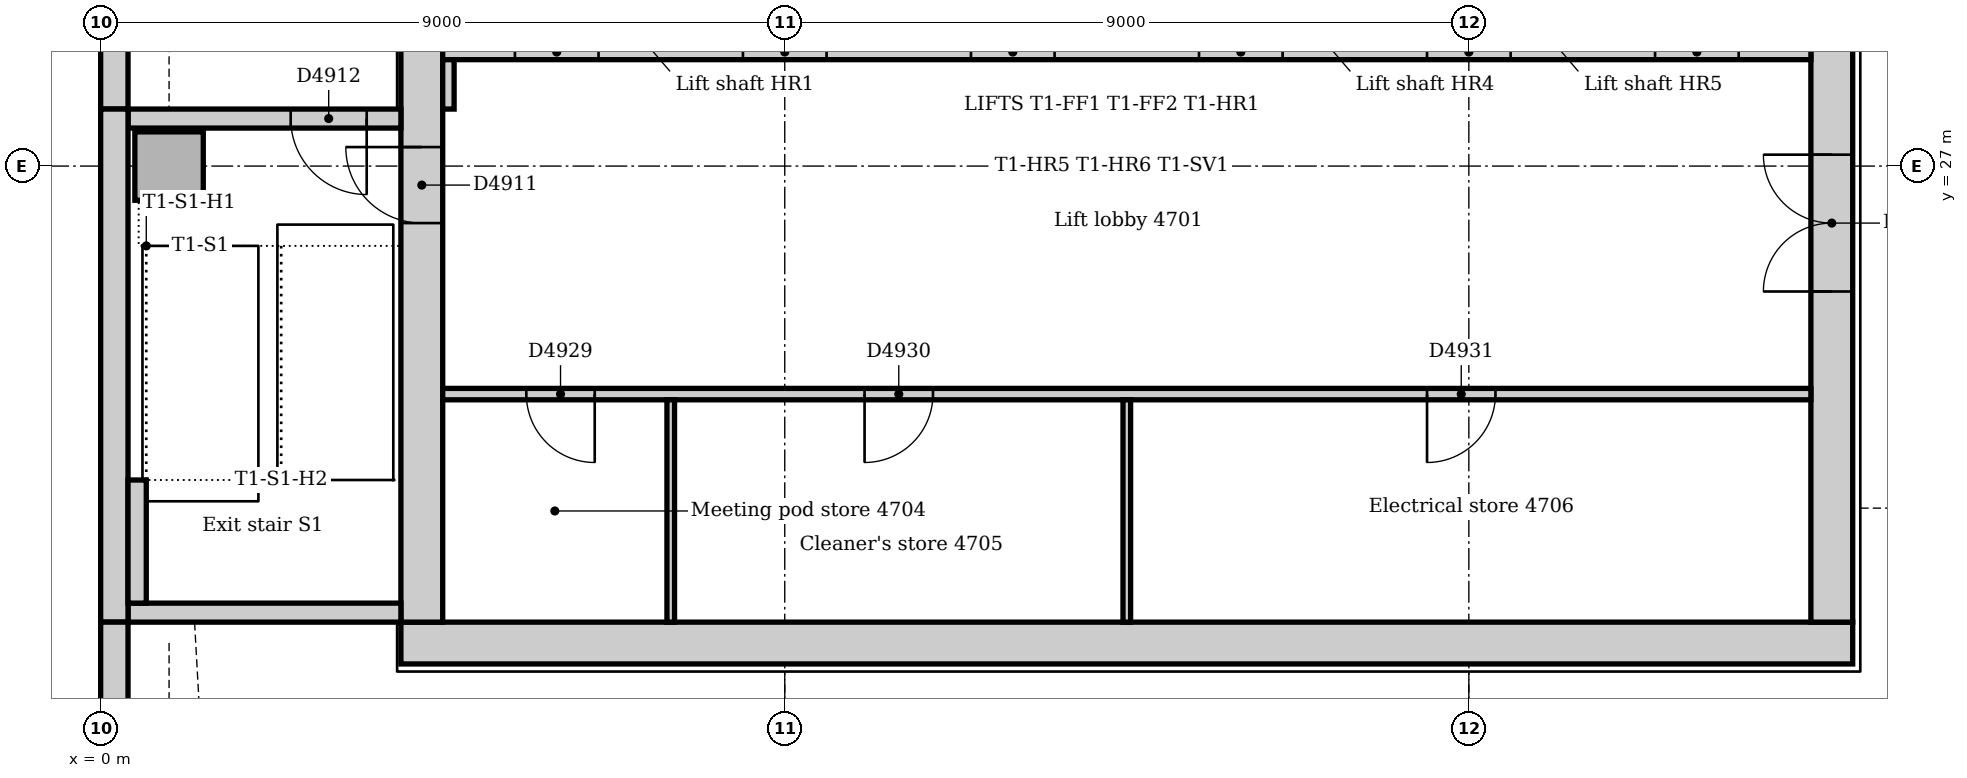
"""IFC4 building model, lengths in metres.
Left out: names, types, materials, properties, quantities, classifications, styles, units other than length and angle.
Written with IfcOpenShell. Run it as: python <this file> out.ifc"""

import sys

from ifc_helpers import new_model, si_unit, direction, frame, frame_2d, origin, origin_2d, place, context, subcontext, project, spatial, rectangle, extrude, element, fill, save


model = new_model("IFC4")
c1 = context("Model", 3, precision=1e-05, world=origin(), true_north=direction((0.0, 1.0)))
c2 = subcontext(c1, "Body", "Model", "MODEL_VIEW")
j1 = project(units=[si_unit("LENGTHUNIT", "METRE"), si_unit("PLANEANGLEUNIT", "RADIAN")], contexts=[c1])
p1 = place(None, origin())
s1 = spatial("IfcSite", under=j1, at=p1, CompositionType="ELEMENT")
p2 = place(p1, origin())
s2 = spatial("IfcBuilding", under=s1, at=p2, CompositionType="ELEMENT")
p3 = place(p2, frame((0.0, 0.0, 198.0)))
s3 = spatial("IfcBuildingStorey", under=s2, at=p3, CompositionType="ELEMENT", Elevation=198.0)
p4 = place(p3, frame((3.95, 20.725, 0.0), z_axis=(0.0, 0.0, 1.0), x_axis=(1.0, 0.0, 0.0)))
e1 = element("IfcWall", 1, at=p4, inside=s3, PredefinedType="SOLIDWALL", context=c2, shape_type="SweptSolid", body=[
    extrude(rectangle(XDim=19.1, YDim=0.55, at=frame_2d((9.55, 0.0))), origin(), (0.0, 0.0, 1.0), 4.0),
])
p5 = place(p3, frame((22.775, 21.0, 0.0), z_axis=(0.0, 0.0, 1.0), x_axis=(0.0, 1.0, 0.0)))
e2 = element("IfcWall", 2, at=p5, inside=s3, PredefinedType="SOLIDWALL", context=c2, shape_type="SweptSolid", body=[
    extrude(rectangle(XDim=10.5, YDim=0.55, at=frame_2d((5.25, 0.0))), origin(), (0.0, 0.0, 1.0), 4.0),
])
p6 = place(p5, frame((4.35, 0.0, 0.0)))
e3 = element("IfcOpeningElement", 3, at=p6, cuts=e2, PredefinedType="OPENING", context=c2, shape_type="SweptSolid", body=[
    extrude(rectangle(XDim=1.8, YDim=2.1, at=frame_2d((0.9, 1.05))), frame((0.0, 0.285, 0.0), z_axis=(0.0, -1.0, 0.0), x_axis=(1.0, 0.0, 0.0)), (0.0, 0.0, 1.0), 0.57),
])
p7 = place(p3, frame((4.225, 31.5, 0.0), z_axis=(0.0, 0.0, 1.0), x_axis=(0.0, -1.0, 0.0)))
e4 = element("IfcWall", 4, at=p7, inside=s3, PredefinedType="SOLIDWALL", context=c2, shape_type="SweptSolid", body=[
    extrude(rectangle(XDim=10.5, YDim=0.55, at=frame_2d((5.25, 0.0))), origin(), (0.0, 0.0, 1.0), 4.0),
])
p8 = place(p7, frame((4.25, 0.0, 0.0)))
e5 = element("IfcOpeningElement", 5, at=p8, cuts=e4, PredefinedType="OPENING", context=c2, shape_type="SweptSolid", body=[
    extrude(rectangle(XDim=1.0, YDim=2.1, at=frame_2d((0.5, 1.05))), frame((0.0, 0.285, 0.0), z_axis=(0.0, -1.0, 0.0), x_axis=(1.0, 0.0, 0.0)), (0.0, 0.0, 1.0), 0.57),
])
p9 = place(p3, frame((0.36, 21.125, 0.0), z_axis=(0.0, 0.0, 1.0), x_axis=(1.0, 0.0, 0.0)))
e6 = element("IfcWall", 6, at=p9, inside=s3, PredefinedType="SOLIDWALL", context=c2, shape_type="SweptSolid", body=[
    extrude(rectangle(XDim=3.59, YDim=0.25, at=frame_2d((1.795, 0.0))), origin(), (0.0, 0.0, 1.0), 4.0),
])
p10 = place(p3, frame((3.95, 27.625, 0.0), z_axis=(0.0, 0.0, 1.0), x_axis=(-1.0, 0.0, 0.0)))
e7 = element("IfcWall", 7, at=p10, inside=s3, PredefinedType="SOLIDWALL", context=c2, shape_type="SweptSolid", body=[
    extrude(rectangle(XDim=3.59, YDim=0.25, at=frame_2d((1.795, 0.0))), origin(), (0.0, 0.0, 1.0), 4.0),
])
p11 = place(p10, frame((0.45, 0.0, 0.0)))
e8 = element("IfcOpeningElement", 8, at=p11, cuts=e7, PredefinedType="OPENING", context=c2, shape_type="SweptSolid", body=[
    extrude(rectangle(XDim=1.0, YDim=2.1, at=frame_2d((0.5, 1.05))), frame((0.0, 0.135, 0.0), z_axis=(0.0, -1.0, 0.0), x_axis=(1.0, 0.0, 0.0)), (0.0, 0.0, 1.0), 0.27),
])
p12 = place(p3, frame((0.9, 27.0, 0.0), z_axis=(0.0, 0.0, 1.0), x_axis=(1.0, 0.0, 0.0)))
e9 = element("IfcColumn", 9, at=p12, inside=s3, PredefinedType="COLUMN", context=c2, shape_type="SweptSolid", body=[
    extrude(rectangle(XDim=0.9, YDim=0.9, at=origin_2d()), origin(), (0.0, 0.0, 1.0), 4.0),
])
p13 = place(p3, frame((0.18, 35.25, 0.0), z_axis=(0.0, 0.0, 1.0), x_axis=(0.0, -1.0, 0.0)))
e10 = element("IfcWall", 10, at=p13, inside=s3, PredefinedType="STANDARD", context=c2, shape_type="SweptSolid", body=[
    extrude(rectangle(XDim=7.5, YDim=0.36, at=frame_2d((3.75, 0.0))), origin(), (0.0, 0.0, 1.0), 3.85),
])
p14 = place(p3, frame((0.18, 27.75, 0.0), z_axis=(0.0, 0.0, 1.0), x_axis=(0.0, -1.0, 0.0)))
e11 = element("IfcWall", 11, at=p14, inside=s3, PredefinedType="STANDARD", context=c2, shape_type="SweptSolid", body=[
    extrude(rectangle(XDim=6.75, YDim=0.36, at=frame_2d((3.375, 0.0))), origin(), (0.0, 0.0, 1.0), 3.85),
])
p15 = place(p3, frame((0.18, 21.0, 0.0), z_axis=(0.0, 0.0, 1.0), x_axis=(0.0, -1.0, 0.0)))
e12 = element("IfcWall", 12, at=p15, inside=s3, PredefinedType="STANDARD", context=c2, shape_type="SweptSolid", body=[
    extrude(rectangle(XDim=3.257, YDim=0.36, at=frame_2d((1.629, 0.0))), origin(), (0.0, 0.0, 1.0), 3.85),
])
p16 = place(p3, frame((0.48, 21.25, 0.0), z_axis=(0.0, 0.0, 1.0), x_axis=(0.0, 1.0, 0.0)))
e13 = element("IfcWall", 13, at=p16, inside=s3, PredefinedType="STANDARD", context=c2, shape_type="SweptSolid", body=[
    extrude(rectangle(XDim=1.62, YDim=0.24, at=frame_2d((0.81, 0.0))), origin(), (0.0, 0.0, 1.0), 4.0),
])
p17 = place(p3, frame((4.5, 28.5, 0.0), z_axis=(0.0, 0.0, 1.0), x_axis=(1.0, 0.0, 0.0)))
e14 = element("IfcWall", 14, at=p17, inside=s3, PredefinedType="PARTITIONING", context=c2, shape_type="SweptSolid", body=[
    extrude(rectangle(XDim=18.0, YDim=0.2, at=frame_2d((9.0, 0.0))), origin(), (0.0, 0.0, 1.0), 3.85),
])
p18 = place(p17, frame((0.95, 0.0, 0.0)))
e15 = element("IfcOpeningElement", 15, at=p18, cuts=e14, PredefinedType="OPENING", context=c2, shape_type="SweptSolid", body=[
    extrude(rectangle(XDim=1.1, YDim=2.1, at=frame_2d((0.55, 1.05))), frame((0.0, 0.11, 0.0), z_axis=(0.0, -1.0, 0.0), x_axis=(1.0, 0.0, 0.0)), (0.0, 0.0, 1.0), 0.22),
])
p19 = place(p17, frame((3.95, 0.0, 0.0)))
e16 = element("IfcOpeningElement", 16, at=p19, cuts=e14, PredefinedType="OPENING", context=c2, shape_type="SweptSolid", body=[
    extrude(rectangle(XDim=1.1, YDim=2.1, at=frame_2d((0.55, 1.05))), frame((0.0, 0.11, 0.0), z_axis=(0.0, -1.0, 0.0), x_axis=(1.0, 0.0, 0.0)), (0.0, 0.0, 1.0), 0.22),
])
p20 = place(p17, frame((6.95, 0.0, 0.0)))
e17 = element("IfcOpeningElement", 17, at=p20, cuts=e14, PredefinedType="OPENING", context=c2, shape_type="SweptSolid", body=[
    extrude(rectangle(XDim=1.1, YDim=2.1, at=frame_2d((0.55, 1.05))), frame((0.0, 0.11, 0.0), z_axis=(0.0, -1.0, 0.0), x_axis=(1.0, 0.0, 0.0)), (0.0, 0.0, 1.0), 0.22),
])
p21 = place(p17, frame((9.95, 0.0, 0.0)))
e18 = element("IfcOpeningElement", 18, at=p21, cuts=e14, PredefinedType="OPENING", context=c2, shape_type="SweptSolid", body=[
    extrude(rectangle(XDim=1.1, YDim=2.1, at=frame_2d((0.55, 1.05))), frame((0.0, 0.11, 0.0), z_axis=(0.0, -1.0, 0.0), x_axis=(1.0, 0.0, 0.0)), (0.0, 0.0, 1.0), 0.22),
])
p22 = place(p17, frame((12.95, 0.0, 0.0)))
e19 = element("IfcOpeningElement", 19, at=p22, cuts=e14, PredefinedType="OPENING", context=c2, shape_type="SweptSolid", body=[
    extrude(rectangle(XDim=1.1, YDim=2.1, at=frame_2d((0.55, 1.05))), frame((0.0, 0.11, 0.0), z_axis=(0.0, -1.0, 0.0), x_axis=(1.0, 0.0, 0.0)), (0.0, 0.0, 1.0), 0.22),
])
p23 = place(p17, frame((15.95, 0.0, 0.0)))
e20 = element("IfcOpeningElement", 20, at=p23, cuts=e14, PredefinedType="OPENING", context=c2, shape_type="SweptSolid", body=[
    extrude(rectangle(XDim=1.1, YDim=2.1, at=frame_2d((0.55, 1.05))), frame((0.0, 0.11, 0.0), z_axis=(0.0, -1.0, 0.0), x_axis=(1.0, 0.0, 0.0)), (0.0, 0.0, 1.0), 0.22),
])
p24 = place(p3, frame((4.5, 24.0, 0.0), z_axis=(0.0, 0.0, 1.0), x_axis=(1.0, 0.0, 0.0)))
e21 = element("IfcWall", 21, at=p24, inside=s3, PredefinedType="PARTITIONING", context=c2, shape_type="SweptSolid", body=[
    extrude(rectangle(XDim=18.0, YDim=0.15, at=frame_2d((9.0, 0.0))), origin(), (0.0, 0.0, 1.0), 3.85),
])
p25 = place(p24, frame((1.1, 0.0, 0.0)))
e22 = element("IfcOpeningElement", 22, at=p25, cuts=e21, PredefinedType="OPENING", context=c2, shape_type="SweptSolid", body=[
    extrude(rectangle(XDim=0.9, YDim=2.1, at=frame_2d((0.45, 1.05))), frame((0.0, 0.085, 0.0), z_axis=(0.0, -1.0, 0.0), x_axis=(1.0, 0.0, 0.0)), (0.0, 0.0, 1.0), 0.17),
])
p26 = place(p24, frame((5.55, 0.0, 0.0)))
e23 = element("IfcOpeningElement", 23, at=p26, cuts=e21, PredefinedType="OPENING", context=c2, shape_type="SweptSolid", body=[
    extrude(rectangle(XDim=0.9, YDim=2.1, at=frame_2d((0.45, 1.05))), frame((0.0, 0.085, 0.0), z_axis=(0.0, -1.0, 0.0), x_axis=(1.0, 0.0, 0.0)), (0.0, 0.0, 1.0), 0.17),
])
p27 = place(p24, frame((12.95, 0.0, 0.0)))
e24 = element("IfcOpeningElement", 24, at=p27, cuts=e21, PredefinedType="OPENING", context=c2, shape_type="SweptSolid", body=[
    extrude(rectangle(XDim=0.9, YDim=2.1, at=frame_2d((0.45, 1.05))), frame((0.0, 0.085, 0.0), z_axis=(0.0, -1.0, 0.0), x_axis=(1.0, 0.0, 0.0)), (0.0, 0.0, 1.0), 0.17),
])
p28 = place(p3, frame((4.575, 27.75, 0.0), z_axis=(0.0, 0.0, 1.0), x_axis=(0.0, 1.0, 0.0)))
e25 = element("IfcWall", 25, at=p28, inside=s3, PredefinedType="PARTITIONING", context=c2, shape_type="SweptSolid", body=[
    extrude(rectangle(XDim=0.65, YDim=0.15, at=frame_2d((0.325, 0.0))), origin(), (0.0, 0.0, 1.0), 3.85),
])
for number, where, z_axis, x_axis in (
    (26, (7.5, 21.0, 0.0), (0.0, 0.0, 1.0), (0.0, 1.0, 0.0)),
    (27, (13.5, 21.0, 0.0), (0.0, 0.0, 1.0), (0.0, 1.0, 0.0)),
):
    element("IfcWall", number, at=place(p3, frame(where, z_axis=z_axis, x_axis=x_axis)), inside=s3, PredefinedType="PARTITIONING", context=c2, shape_type="SweptSolid", body=[
        extrude(rectangle(XDim=2.925, YDim=0.1, at=frame_2d((1.462, 0.0))), origin(), (0.0, 0.0, 1.0), 3.85),
    ])
p29 = place(p8, frame((1.0, 0.0, 0.0), z_axis=(0.0, 0.0, 1.0), x_axis=(-1.0, 0.0, 0.0)))
e28 = element("IfcDoor", 28, at=p29, inside=s3, OperationType="SINGLE_SWING_RIGHT", PredefinedType="DOOR", context=c2, shape_type="SweptSolid", body=[
    extrude(rectangle(XDim=1.0, YDim=2.1, at=frame_2d((0.5, 1.05))), frame((0.0, 0.025, 0.0), z_axis=(0.0, -1.0, 0.0), x_axis=(1.0, 0.0, 0.0)), (0.0, 0.0, 1.0), 0.05),
])
fill(e5, e28)
p30 = place(p11, origin())
e29 = element("IfcDoor", 29, at=p30, inside=s3, OperationType="SINGLE_SWING_LEFT", PredefinedType="DOOR", context=c2, shape_type="SweptSolid", body=[
    extrude(rectangle(XDim=1.0, YDim=2.1, at=frame_2d((0.5, 1.05))), frame((0.0, 0.025, 0.0), z_axis=(0.0, -1.0, 0.0), x_axis=(1.0, 0.0, 0.0)), (0.0, 0.0, 1.0), 0.05),
])
fill(e8, e29)
p31 = place(p18, origin())
e30 = element("IfcDoor", 30, at=p31, inside=s3, OperationType="SLIDING_TO_LEFT", PredefinedType="DOOR", context=c2, shape_type="SweptSolid", body=[
    extrude(rectangle(XDim=1.1, YDim=2.1, at=frame_2d((0.55, 1.05))), frame((0.0, 0.025, 0.0), z_axis=(0.0, -1.0, 0.0), x_axis=(1.0, 0.0, 0.0)), (0.0, 0.0, 1.0), 0.05),
])
fill(e15, e30)
p32 = place(p19, origin())
e31 = element("IfcDoor", 31, at=p32, inside=s3, OperationType="SLIDING_TO_LEFT", PredefinedType="DOOR", context=c2, shape_type="SweptSolid", body=[
    extrude(rectangle(XDim=1.1, YDim=2.1, at=frame_2d((0.55, 1.05))), frame((0.0, 0.025, 0.0), z_axis=(0.0, -1.0, 0.0), x_axis=(1.0, 0.0, 0.0)), (0.0, 0.0, 1.0), 0.05),
])
fill(e16, e31)
p33 = place(p20, origin())
e32 = element("IfcDoor", 32, at=p33, inside=s3, OperationType="SLIDING_TO_LEFT", PredefinedType="DOOR", context=c2, shape_type="SweptSolid", body=[
    extrude(rectangle(XDim=1.1, YDim=2.1, at=frame_2d((0.55, 1.05))), frame((0.0, 0.025, 0.0), z_axis=(0.0, -1.0, 0.0), x_axis=(1.0, 0.0, 0.0)), (0.0, 0.0, 1.0), 0.05),
])
fill(e17, e32)
p34 = place(p21, origin())
e33 = element("IfcDoor", 33, at=p34, inside=s3, OperationType="SLIDING_TO_LEFT", PredefinedType="DOOR", context=c2, shape_type="SweptSolid", body=[
    extrude(rectangle(XDim=1.1, YDim=2.1, at=frame_2d((0.55, 1.05))), frame((0.0, 0.025, 0.0), z_axis=(0.0, -1.0, 0.0), x_axis=(1.0, 0.0, 0.0)), (0.0, 0.0, 1.0), 0.05),
])
fill(e18, e33)
p35 = place(p22, origin())
e34 = element("IfcDoor", 34, at=p35, inside=s3, OperationType="SLIDING_TO_LEFT", PredefinedType="DOOR", context=c2, shape_type="SweptSolid", body=[
    extrude(rectangle(XDim=1.1, YDim=2.1, at=frame_2d((0.55, 1.05))), frame((0.0, 0.025, 0.0), z_axis=(0.0, -1.0, 0.0), x_axis=(1.0, 0.0, 0.0)), (0.0, 0.0, 1.0), 0.05),
])
fill(e19, e34)
p36 = place(p23, origin())
e35 = element("IfcDoor", 35, at=p36, inside=s3, OperationType="SLIDING_TO_LEFT", PredefinedType="DOOR", context=c2, shape_type="SweptSolid", body=[
    extrude(rectangle(XDim=1.1, YDim=2.1, at=frame_2d((0.55, 1.05))), frame((0.0, 0.025, 0.0), z_axis=(0.0, -1.0, 0.0), x_axis=(1.0, 0.0, 0.0)), (0.0, 0.0, 1.0), 0.05),
])
fill(e20, e35)
p37 = place(p6, origin())
e36 = element("IfcDoor", 36, at=p37, inside=s3, OperationType="DOUBLE_DOOR_DOUBLE_SWING", PredefinedType="DOOR", context=c2, shape_type="SweptSolid", body=[
    extrude(rectangle(XDim=1.8, YDim=2.1, at=frame_2d((0.9, 1.05))), frame((0.0, 0.025, 0.0), z_axis=(0.0, -1.0, 0.0), x_axis=(1.0, 0.0, 0.0)), (0.0, 0.0, 1.0), 0.05),
])
fill(e3, e36)
p38 = place(p25, frame((0.9, 0.0, 0.0), z_axis=(0.0, 0.0, 1.0), x_axis=(-1.0, 0.0, 0.0)))
e37 = element("IfcDoor", 37, at=p38, inside=s3, OperationType="SINGLE_SWING_LEFT", PredefinedType="DOOR", context=c2, shape_type="SweptSolid", body=[
    extrude(rectangle(XDim=0.9, YDim=2.1, at=frame_2d((0.45, 1.05))), frame((0.0, 0.025, 0.0), z_axis=(0.0, -1.0, 0.0), x_axis=(1.0, 0.0, 0.0)), (0.0, 0.0, 1.0), 0.05),
])
fill(e22, e37)
p39 = place(p26, frame((0.9, 0.0, 0.0), z_axis=(0.0, 0.0, 1.0), x_axis=(-1.0, 0.0, 0.0)))
e38 = element("IfcDoor", 38, at=p39, inside=s3, OperationType="SINGLE_SWING_RIGHT", PredefinedType="DOOR", context=c2, shape_type="SweptSolid", body=[
    extrude(rectangle(XDim=0.9, YDim=2.1, at=frame_2d((0.45, 1.05))), frame((0.0, 0.025, 0.0), z_axis=(0.0, -1.0, 0.0), x_axis=(1.0, 0.0, 0.0)), (0.0, 0.0, 1.0), 0.05),
])
fill(e23, e38)
p40 = place(p27, frame((0.9, 0.0, 0.0), z_axis=(0.0, 0.0, 1.0), x_axis=(-1.0, 0.0, 0.0)))
e39 = element("IfcDoor", 39, at=p40, inside=s3, OperationType="SINGLE_SWING_RIGHT", PredefinedType="DOOR", context=c2, shape_type="SweptSolid", body=[
    extrude(rectangle(XDim=0.9, YDim=2.1, at=frame_2d((0.45, 1.05))), frame((0.0, 0.025, 0.0), z_axis=(0.0, -1.0, 0.0), x_axis=(1.0, 0.0, 0.0)), (0.0, 0.0, 1.0), 0.05),
])
fill(e24, e39)
save(model, sys.argv[1])
